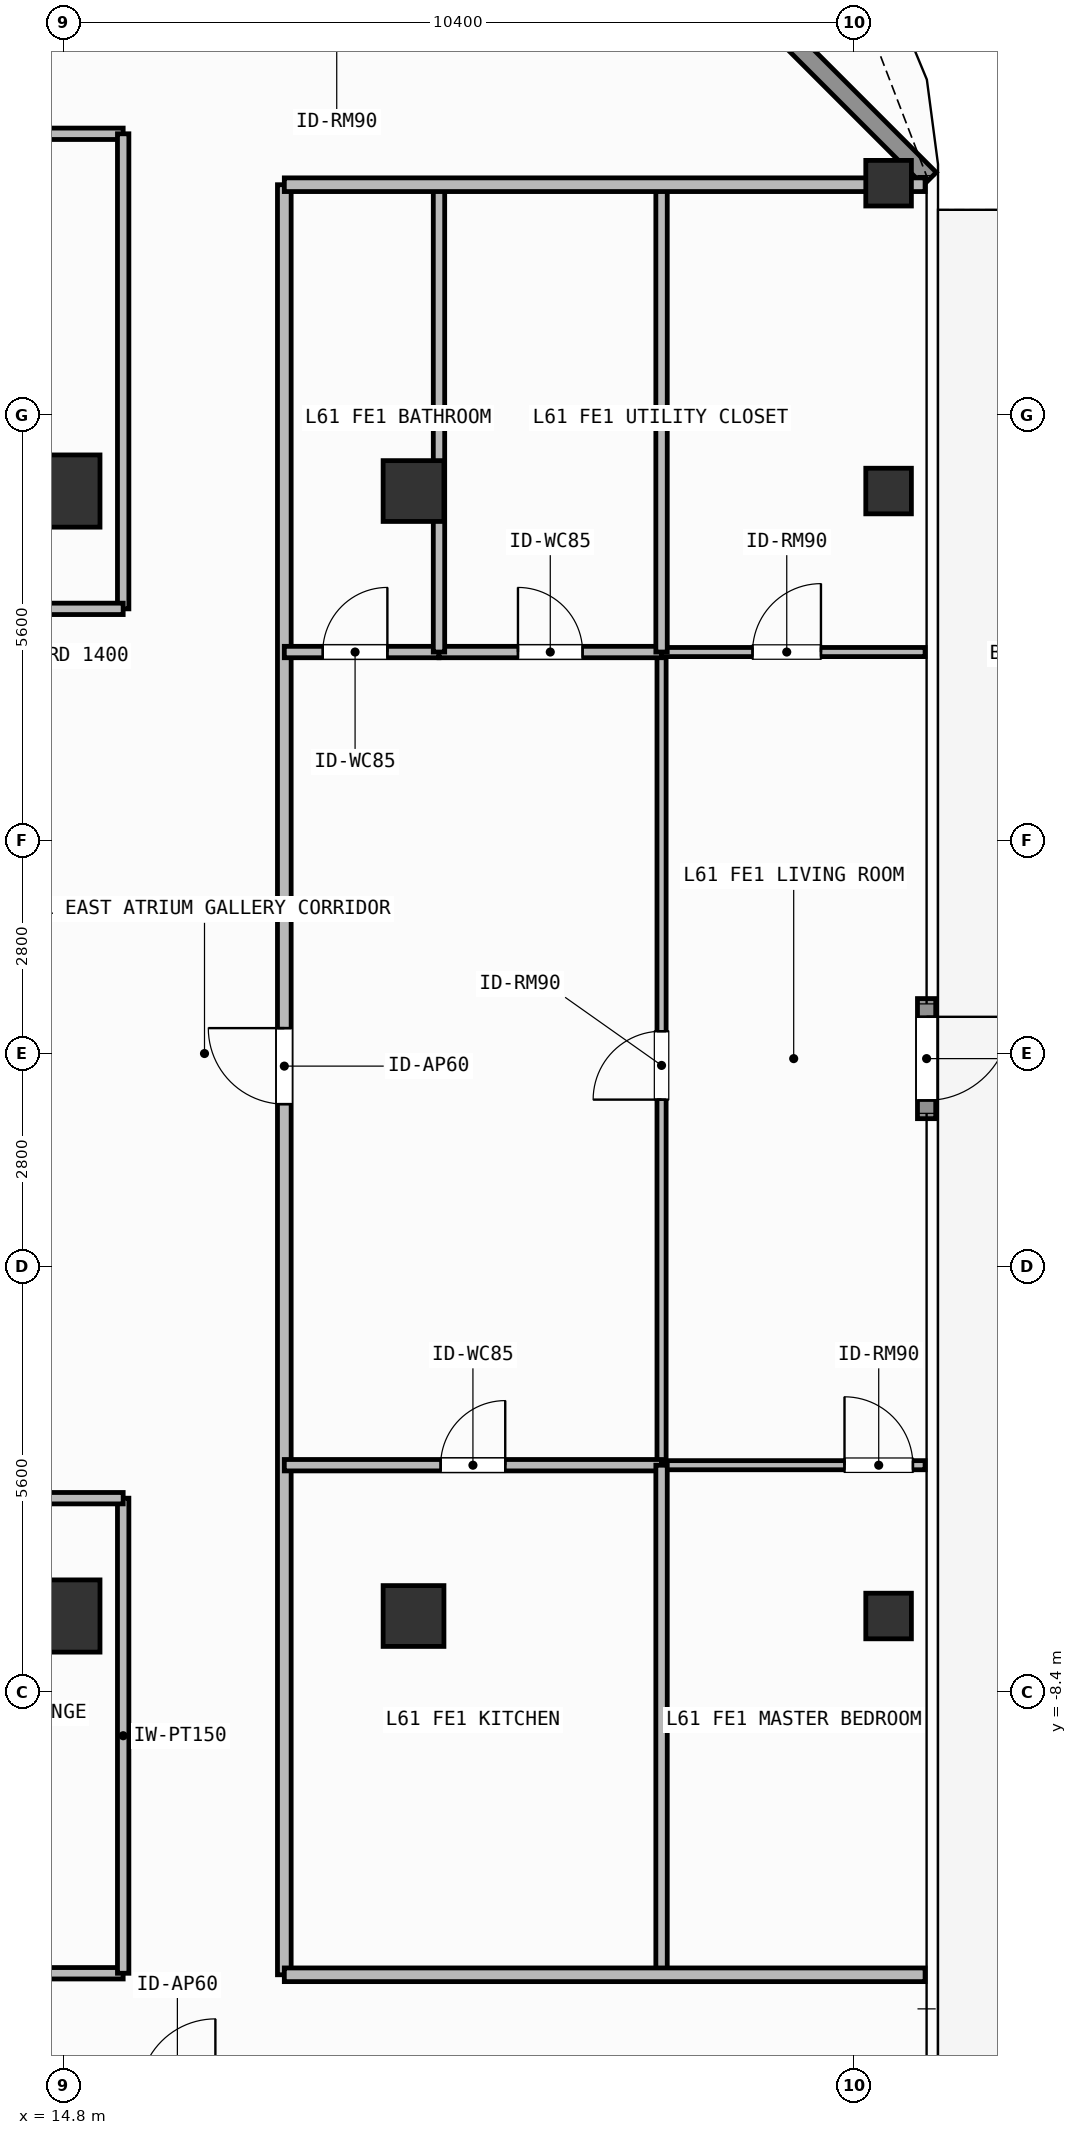
"""IFC4 building model, lengths in metres.
Left out: names, types, materials, properties, quantities, classifications, styles, units other than length and angle.
Written with IfcOpenShell. Run it as: python <this file> out.ifc"""

import sys

from ifc_helpers import new_model, si_unit, direction, frame, frame_2d, origin, origin_2d, place, context, subcontext, project, spatial, rectangle, hollow_rectangle, extrude, element, fill, save


model = new_model("IFC4")
c1 = context("Model", 3, precision=1e-05, world=origin(), true_north=direction((0.0, 1.0)))
c2 = subcontext(c1, "Body", "Model", "MODEL_VIEW")
j1 = project(units=[si_unit("LENGTHUNIT", "METRE"), si_unit("PLANEANGLEUNIT", "RADIAN")], contexts=[c1])
p1 = place(None, origin())
s1 = spatial("IfcSite", under=j1, at=p1, CompositionType="ELEMENT")
p2 = place(p1, origin())
s2 = spatial("IfcBuilding", under=s1, at=p2, CompositionType="ELEMENT")
p3 = place(p2, frame((0.0, 0.0, 250.8)))
s3 = spatial("IfcBuildingStorey", under=s2, at=p3, CompositionType="ELEMENT", Elevation=250.8)
for number, where, z_axis, x_axis in (
    (1, (14.8, -7.4, 0.0), (0.0, 0.0, 1.0), (1.0, 0.0, 0.0)),
    (2, (14.8, 7.4, 0.0), (0.0, 0.0, 1.0), (1.0, 0.0, 0.0)),
):
    element("IfcColumn", number, at=place(p3, frame(where, z_axis=z_axis, x_axis=x_axis)), inside=s3, PredefinedType="COLUMN", context=c2, shape_type="SweptSolid", body=[
        extrude(rectangle(XDim=0.95, YDim=0.95, at=origin_2d()), origin(), (0.0, 0.0, 1.0), 3.9),
    ])
for number, where, z_axis, x_axis in (
    (3, (19.4, -7.4, 0.0), (0.0, 0.0, 1.0), (1.0, 0.0, 0.0)),
    (4, (19.4, 7.4, 0.0), (0.0, 0.0, 1.0), (1.0, 0.0, 0.0)),
):
    element("IfcColumn", number, at=place(p3, frame(where, z_axis=z_axis, x_axis=x_axis)), inside=s3, PredefinedType="COLUMN", context=c2, shape_type="SweptSolid", body=[
        extrude(hollow_rectangle(XDim=0.8, YDim=0.8, WallThickness=0.036, at=origin_2d()), origin(), (0.0, 0.0, 1.0), 3.9),
    ])
for number, where, z_axis, x_axis in (
    (5, (25.65, 11.45, 0.0), (0.0, 0.0, 1.0), (1.0, 0.0, 0.0)),
    (6, (25.65, -7.4, 0.0), (0.0, 0.0, 1.0), (1.0, 0.0, 0.0)),
    (7, (25.65, 7.4, 0.0), (0.0, 0.0, 1.0), (1.0, 0.0, 0.0)),
):
    element("IfcColumn", number, at=place(p3, frame(where, z_axis=z_axis, x_axis=x_axis)), inside=s3, PredefinedType="COLUMN", context=c2, shape_type="SweptSolid", body=[
        extrude(hollow_rectangle(XDim=0.6, YDim=0.6, WallThickness=0.028, at=origin_2d()), origin(), (0.0, 0.0, 1.0), 3.9),
    ])
p4 = place(p3, frame((26.15, 0.723, 0.0), z_axis=(0.0, 0.0, 1.0), x_axis=(0.0, -1.0, 0.0)))
e8 = element("IfcWall", 8, at=p4, inside=s3, PredefinedType="SOLIDWALL", context=c2, shape_type="SweptSolid", body=[
    extrude(rectangle(XDim=1.58, YDim=0.24, at=frame_2d((0.79, 0.0))), origin(), (0.0, 0.0, 1.0), 3.62),
])
p5 = place(p4, frame((0.24, 0.0, 0.0)))
e9 = element("IfcOpeningElement", 9, at=p5, cuts=e8, PredefinedType="OPENING", context=c2, shape_type="SweptSolid", body=[
    extrude(rectangle(XDim=1.1, YDim=2.2, at=frame_2d((0.55, 1.1))), frame((0.0, 0.13, 0.0), z_axis=(0.0, -1.0, 0.0), x_axis=(1.0, 0.0, 0.0)), (0.0, 0.0, 1.0), 0.26),
])
p6 = place(p3, frame((21.808, 15.892, 0.0), z_axis=(0.0, 0.0, 1.0), x_axis=(0.707106781187, -0.707106781187, 0.0)))
e10 = element("IfcWall", 10, at=p6, inside=s3, PredefinedType="SOLIDWALL", context=c2, shape_type="SweptSolid", body=[
    extrude(rectangle(XDim=6.201, YDim=0.24, at=frame_2d((3.101, 0.0))), origin(), (0.0, 0.0, 1.0), 3.62),
])
p7 = place(p3, frame((10.1, -12.1, 0.0), z_axis=(0.0, 0.0, 1.0), x_axis=(1.0, 0.0, 0.0)))
e11 = element("IfcWall", 11, at=p7, inside=s3, PredefinedType="PARTITIONING", context=c2, shape_type="SweptSolid", body=[
    extrude(rectangle(XDim=5.48, YDim=0.15, at=frame_2d((2.74, 0.0))), origin(), (0.0, 0.0, 1.0), 3.62),
])
p8 = place(p7, frame((2.29, 0.0, 0.0)))
e12 = element("IfcOpeningElement", 12, at=p8, cuts=e11, PredefinedType="OPENING", context=c2, shape_type="SweptSolid", body=[
    extrude(rectangle(XDim=0.9, YDim=2.1, at=frame_2d((0.45, 1.05))), frame((0.0, 0.085, 0.0), z_axis=(0.0, -1.0, 0.0), x_axis=(1.0, 0.0, 0.0)), (0.0, 0.0, 1.0), 0.17),
])
p9 = place(p3, frame((8.36, 12.1, 0.0), z_axis=(0.0, 0.0, 1.0), x_axis=(1.0, 0.0, 0.0)))
e13 = element("IfcWall", 13, at=p9, inside=s3, PredefinedType="PARTITIONING", context=c2, shape_type="SweptSolid", body=[
    extrude(rectangle(XDim=7.22, YDim=0.15, at=frame_2d((3.61, 0.0))), origin(), (0.0, 0.0, 1.0), 3.62),
])
p10 = place(p9, frame((3.513, 0.0, 0.0)))
e14 = element("IfcOpeningElement", 14, at=p10, cuts=e13, PredefinedType="OPENING", context=c2, shape_type="SweptSolid", body=[
    extrude(rectangle(XDim=0.9, YDim=2.1, at=frame_2d((0.45, 1.05))), frame((0.0, 0.085, 0.0), z_axis=(0.0, -1.0, 0.0), x_axis=(1.0, 0.0, 0.0)), (0.0, 0.0, 1.0), 0.17),
])
p11 = place(p3, frame((17.7, -12.12, 0.0), z_axis=(0.0, 0.0, 1.0), x_axis=(0.0, 1.0, 0.0)))
e15 = element("IfcWall", 15, at=p11, inside=s3, PredefinedType="PARTITIONING", context=c2, shape_type="SweptSolid", body=[
    extrude(rectangle(XDim=23.55, YDim=0.18, at=frame_2d((11.775, 0.0))), origin(), (0.0, 0.0, 1.0), 3.62),
])
p12 = place(p11, frame((11.454, 0.0, 0.0)))
e16 = element("IfcOpeningElement", 16, at=p12, cuts=e15, PredefinedType="OPENING", context=c2, shape_type="SweptSolid", body=[
    extrude(rectangle(XDim=1.0, YDim=2.2, at=frame_2d((0.5, 1.1))), frame((0.0, 0.1, 0.0), z_axis=(0.0, -1.0, 0.0), x_axis=(1.0, 0.0, 0.0)), (0.0, 0.0, 1.0), 0.2),
])
p13 = place(p3, frame((22.663, -5.416, 0.0), z_axis=(0.0, 0.0, 1.0), x_axis=(0.0, 1.0, 0.0)))
e17 = element("IfcWall", 17, at=p13, inside=s3, PredefinedType="PARTITIONING", context=c2, shape_type="SweptSolid", body=[
    extrude(rectangle(XDim=10.698, YDim=0.12, at=frame_2d((5.349, 0.0))), origin(), (0.0, 0.0, 1.0), 3.62),
])
p14 = place(p13, frame((4.81, 0.0, 0.0)))
e18 = element("IfcOpeningElement", 18, at=p14, cuts=e17, PredefinedType="OPENING", context=c2, shape_type="SweptSolid", body=[
    extrude(rectangle(XDim=0.9, YDim=2.1, at=frame_2d((0.45, 1.05))), frame((0.0, 0.07, 0.0), z_axis=(0.0, -1.0, 0.0), x_axis=(1.0, 0.0, 0.0)), (0.0, 0.0, 1.0), 0.14),
])
p15 = place(p3, frame((17.7, 5.282, 0.0), z_axis=(0.0, 0.0, 1.0), x_axis=(1.0, 0.0, 0.0)))
e19 = element("IfcWall", 19, at=p15, inside=s3, PredefinedType="PARTITIONING", context=c2, shape_type="SweptSolid", body=[
    extrude(rectangle(XDim=2.035, YDim=0.15, at=frame_2d((1.018, 0.0))), origin(), (0.0, 0.0, 1.0), 3.62),
])
p16 = place(p15, frame((0.506, 0.0, 0.0)))
e20 = element("IfcOpeningElement", 20, at=p16, cuts=e19, PredefinedType="OPENING", context=c2, shape_type="SweptSolid", body=[
    extrude(rectangle(XDim=0.85, YDim=2.1, at=frame_2d((0.425, 1.05))), frame((0.0, 0.085, 0.0), z_axis=(0.0, -1.0, 0.0), x_axis=(1.0, 0.0, 0.0)), (0.0, 0.0, 1.0), 0.17),
])
p17 = place(p3, frame((19.735, 5.282, 0.0), z_axis=(0.0, 0.0, 1.0), x_axis=(1.0, 0.0, 0.0)))
e21 = element("IfcWall", 21, at=p17, inside=s3, PredefinedType="PARTITIONING", context=c2, shape_type="SweptSolid", body=[
    extrude(rectangle(XDim=2.928, YDim=0.15, at=frame_2d((1.464, 0.0))), origin(), (0.0, 0.0, 1.0), 3.62),
])
p18 = place(p17, frame((1.039, 0.0, 0.0)))
e22 = element("IfcOpeningElement", 22, at=p18, cuts=e21, PredefinedType="OPENING", context=c2, shape_type="SweptSolid", body=[
    extrude(rectangle(XDim=0.85, YDim=2.1, at=frame_2d((0.425, 1.05))), frame((0.0, 0.085, 0.0), z_axis=(0.0, -1.0, 0.0), x_axis=(1.0, 0.0, 0.0)), (0.0, 0.0, 1.0), 0.17),
])
p19 = place(p3, frame((17.7, -5.416, 0.0), z_axis=(0.0, 0.0, 1.0), x_axis=(1.0, 0.0, 0.0)))
e23 = element("IfcWall", 23, at=p19, inside=s3, PredefinedType="PARTITIONING", context=c2, shape_type="SweptSolid", body=[
    extrude(rectangle(XDim=4.963, YDim=0.15, at=frame_2d((2.481, 0.0))), origin(), (0.0, 0.0, 1.0), 3.62),
])
p20 = place(p19, frame((2.056, 0.0, 0.0)))
e24 = element("IfcOpeningElement", 24, at=p20, cuts=e23, PredefinedType="OPENING", context=c2, shape_type="SweptSolid", body=[
    extrude(rectangle(XDim=0.85, YDim=2.1, at=frame_2d((0.425, 1.05))), frame((0.0, 0.085, 0.0), z_axis=(0.0, -1.0, 0.0), x_axis=(1.0, 0.0, 0.0)), (0.0, 0.0, 1.0), 0.17),
])
p21 = place(p3, frame((22.663, -5.416, 0.0), z_axis=(0.0, 0.0, 1.0), x_axis=(1.0, 0.0, 0.0)))
e25 = element("IfcWall", 25, at=p21, inside=s3, PredefinedType="PARTITIONING", context=c2, shape_type="SweptSolid", body=[
    extrude(rectangle(XDim=3.467, YDim=0.12, at=frame_2d((1.733, 0.0))), origin(), (0.0, 0.0, 1.0), 3.62),
])
p22 = place(p21, frame((2.407, 0.0, 0.0)))
e26 = element("IfcOpeningElement", 26, at=p22, cuts=e25, PredefinedType="OPENING", context=c2, shape_type="SweptSolid", body=[
    extrude(rectangle(XDim=0.9, YDim=2.1, at=frame_2d((0.45, 1.05))), frame((0.0, 0.07, 0.0), z_axis=(0.0, -1.0, 0.0), x_axis=(1.0, 0.0, 0.0)), (0.0, 0.0, 1.0), 0.14),
])
p23 = place(p3, frame((22.663, 5.282, 0.0), z_axis=(0.0, 0.0, 1.0), x_axis=(1.0, 0.0, 0.0)))
e27 = element("IfcWall", 27, at=p23, inside=s3, PredefinedType="PARTITIONING", context=c2, shape_type="SweptSolid", body=[
    extrude(rectangle(XDim=3.467, YDim=0.12, at=frame_2d((1.733, 0.0))), origin(), (0.0, 0.0, 1.0), 3.62),
])
p24 = place(p23, frame((1.197, 0.0, 0.0)))
e28 = element("IfcOpeningElement", 28, at=p24, cuts=e27, PredefinedType="OPENING", context=c2, shape_type="SweptSolid", body=[
    extrude(rectangle(XDim=0.9, YDim=2.1, at=frame_2d((0.45, 1.05))), frame((0.0, 0.07, 0.0), z_axis=(0.0, -1.0, 0.0), x_axis=(1.0, 0.0, 0.0)), (0.0, 0.0, 1.0), 0.14),
])
p25 = place(p3, frame((15.58, -12.1, 0.0), z_axis=(0.0, 0.0, 1.0), x_axis=(0.0, 1.0, 0.0)))
e29 = element("IfcWall", 29, at=p25, inside=s3, PredefinedType="PARTITIONING", context=c2, shape_type="SweptSolid", body=[
    extrude(rectangle(XDim=6.25, YDim=0.15, at=frame_2d((3.125, 0.0))), origin(), (0.0, 0.0, 1.0), 3.62),
])
p26 = place(p3, frame((8.96, -5.85, 0.0), z_axis=(0.0, 0.0, 1.0), x_axis=(1.0, 0.0, 0.0)))
e30 = element("IfcWall", 30, at=p26, inside=s3, PredefinedType="PARTITIONING", context=c2, shape_type="SweptSolid", body=[
    extrude(rectangle(XDim=6.62, YDim=0.15, at=frame_2d((3.31, 0.0))), origin(), (0.0, 0.0, 1.0), 3.62),
])
p27 = place(p3, frame((15.58, 5.85, 0.0), z_axis=(0.0, 0.0, 1.0), x_axis=(0.0, 1.0, 0.0)))
e31 = element("IfcWall", 31, at=p27, inside=s3, PredefinedType="PARTITIONING", context=c2, shape_type="SweptSolid", body=[
    extrude(rectangle(XDim=6.25, YDim=0.15, at=frame_2d((3.125, 0.0))), origin(), (0.0, 0.0, 1.0), 3.62),
])
p28 = place(p3, frame((8.96, 5.85, 0.0), z_axis=(0.0, 0.0, 1.0), x_axis=(1.0, 0.0, 0.0)))
e32 = element("IfcWall", 32, at=p28, inside=s3, PredefinedType="PARTITIONING", context=c2, shape_type="SweptSolid", body=[
    extrude(rectangle(XDim=6.62, YDim=0.15, at=frame_2d((3.31, 0.0))), origin(), (0.0, 0.0, 1.0), 3.62),
])
p29 = place(p3, frame((19.735, 5.282, 0.0), z_axis=(0.0, 0.0, 1.0), x_axis=(0.0, 1.0, 0.0)))
e33 = element("IfcWall", 33, at=p29, inside=s3, PredefinedType="PARTITIONING", context=c2, shape_type="SweptSolid", body=[
    extrude(rectangle(XDim=6.148, YDim=0.15, at=frame_2d((3.074, 0.0))), origin(), (0.0, 0.0, 1.0), 2.71),
])
p30 = place(p3, frame((22.663, -12.12, 0.0), z_axis=(0.0, 0.0, 1.0), x_axis=(0.0, 1.0, 0.0)))
e34 = element("IfcWall", 34, at=p30, inside=s3, PredefinedType="PARTITIONING", context=c2, shape_type="SweptSolid", body=[
    extrude(rectangle(XDim=6.704, YDim=0.15, at=frame_2d((3.352, 0.0))), origin(), (0.0, 0.0, 1.0), 3.62),
])
p31 = place(p3, frame((22.663, 5.282, 0.0), z_axis=(0.0, 0.0, 1.0), x_axis=(0.0, 1.0, 0.0)))
e35 = element("IfcWall", 35, at=p31, inside=s3, PredefinedType="PARTITIONING", context=c2, shape_type="SweptSolid", body=[
    extrude(rectangle(XDim=6.148, YDim=0.15, at=frame_2d((3.074, 0.0))), origin(), (0.0, 0.0, 1.0), 3.62),
])
for number, where, z_axis, x_axis in (
    (36, (17.7, -12.12, 0.0), (0.0, 0.0, 1.0), (1.0, 0.0, 0.0)),
    (37, (17.7, 11.43, 0.0), (0.0, 0.0, 1.0), (1.0, 0.0, 0.0)),
):
    element("IfcWall", number, at=place(p3, frame(where, z_axis=z_axis, x_axis=x_axis)), inside=s3, PredefinedType="PARTITIONING", context=c2, shape_type="SweptSolid", body=[
        extrude(rectangle(XDim=8.43, YDim=0.18, at=frame_2d((4.215, 0.0))), origin(), (0.0, 0.0, 1.0), 3.62),
    ])
p32 = place(p5, origin())
e38 = element("IfcDoor", 38, at=p32, inside=s3, OperationType="SINGLE_SWING_LEFT", PredefinedType="DOOR", context=c2, shape_type="SweptSolid", body=[
    extrude(rectangle(XDim=1.1, YDim=2.2, at=frame_2d((0.55, 1.1))), frame((0.0, 0.025, 0.0), z_axis=(0.0, -1.0, 0.0), x_axis=(1.0, 0.0, 0.0)), (0.0, 0.0, 1.0), 0.05),
])
fill(e9, e38)
p33 = place(p12, origin())
e39 = element("IfcDoor", 39, at=p33, inside=s3, OperationType="SINGLE_SWING_RIGHT", PredefinedType="DOOR", context=c2, shape_type="SweptSolid", body=[
    extrude(rectangle(XDim=1.0, YDim=2.2, at=frame_2d((0.5, 1.1))), frame((0.0, 0.025, 0.0), z_axis=(0.0, -1.0, 0.0), x_axis=(1.0, 0.0, 0.0)), (0.0, 0.0, 1.0), 0.05),
])
fill(e16, e39)
p34 = place(p14, origin())
e40 = element("IfcDoor", 40, at=p34, inside=s3, OperationType="SINGLE_SWING_LEFT", PredefinedType="DOOR", context=c2, shape_type="SweptSolid", body=[
    extrude(rectangle(XDim=0.9, YDim=2.1, at=frame_2d((0.45, 1.05))), frame((0.0, 0.025, 0.0), z_axis=(0.0, -1.0, 0.0), x_axis=(1.0, 0.0, 0.0)), (0.0, 0.0, 1.0), 0.05),
])
fill(e18, e40)
p35 = place(p16, origin())
e41 = element("IfcDoor", 41, at=p35, inside=s3, OperationType="SINGLE_SWING_RIGHT", PredefinedType="DOOR", context=c2, shape_type="SweptSolid", body=[
    extrude(rectangle(XDim=0.85, YDim=2.1, at=frame_2d((0.425, 1.05))), frame((0.0, 0.025, 0.0), z_axis=(0.0, -1.0, 0.0), x_axis=(1.0, 0.0, 0.0)), (0.0, 0.0, 1.0), 0.05),
])
fill(e20, e41)
p36 = place(p18, origin())
e42 = element("IfcDoor", 42, at=p36, inside=s3, OperationType="SINGLE_SWING_LEFT", PredefinedType="DOOR", context=c2, shape_type="SweptSolid", body=[
    extrude(rectangle(XDim=0.85, YDim=2.1, at=frame_2d((0.425, 1.05))), frame((0.0, 0.025, 0.0), z_axis=(0.0, -1.0, 0.0), x_axis=(1.0, 0.0, 0.0)), (0.0, 0.0, 1.0), 0.05),
])
fill(e22, e42)
p37 = place(p20, origin())
e43 = element("IfcDoor", 43, at=p37, inside=s3, OperationType="SINGLE_SWING_RIGHT", PredefinedType="DOOR", context=c2, shape_type="SweptSolid", body=[
    extrude(rectangle(XDim=0.85, YDim=2.1, at=frame_2d((0.425, 1.05))), frame((0.0, 0.025, 0.0), z_axis=(0.0, -1.0, 0.0), x_axis=(1.0, 0.0, 0.0)), (0.0, 0.0, 1.0), 0.05),
])
fill(e24, e43)
p38 = place(p22, origin())
e44 = element("IfcDoor", 44, at=p38, inside=s3, OperationType="SINGLE_SWING_LEFT", PredefinedType="DOOR", context=c2, shape_type="SweptSolid", body=[
    extrude(rectangle(XDim=0.9, YDim=2.1, at=frame_2d((0.45, 1.05))), frame((0.0, 0.025, 0.0), z_axis=(0.0, -1.0, 0.0), x_axis=(1.0, 0.0, 0.0)), (0.0, 0.0, 1.0), 0.05),
])
fill(e26, e44)
p39 = place(p24, origin())
e45 = element("IfcDoor", 45, at=p39, inside=s3, OperationType="SINGLE_SWING_RIGHT", PredefinedType="DOOR", context=c2, shape_type="SweptSolid", body=[
    extrude(rectangle(XDim=0.9, YDim=2.1, at=frame_2d((0.45, 1.05))), frame((0.0, 0.025, 0.0), z_axis=(0.0, -1.0, 0.0), x_axis=(1.0, 0.0, 0.0)), (0.0, 0.0, 1.0), 0.05),
])
fill(e28, e45)
save(model, sys.argv[1])
